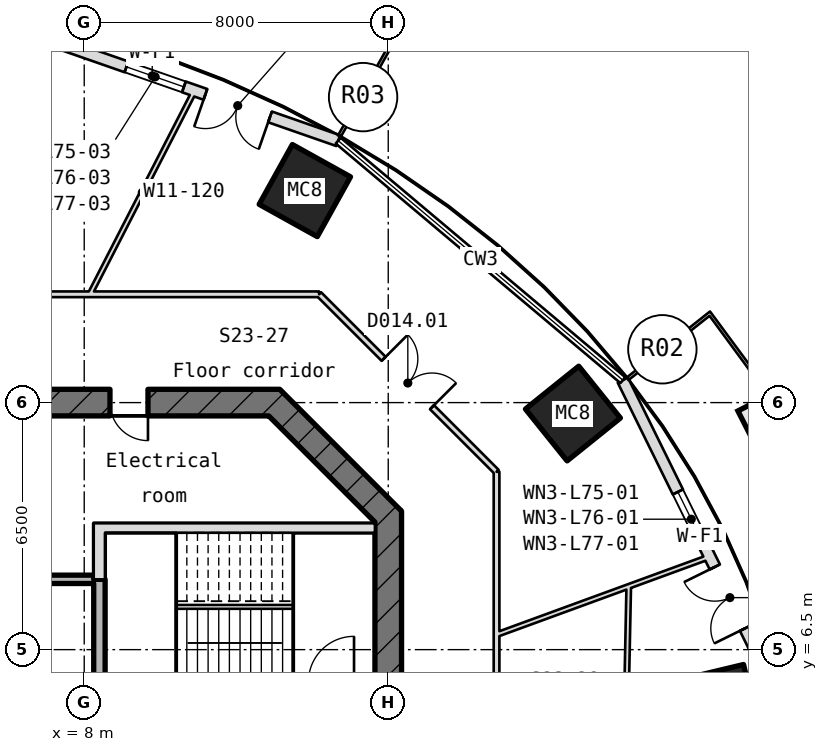
"""IFC4 building model, lengths in metres.
Left out: names, types, materials, properties, quantities, classifications, styles, units other than length and angle.
Written with IfcOpenShell. Run it as: python <this file> out.ifc"""

import sys

from ifc_helpers import new_model, si_unit, direction, frame, frame_2d, origin, origin_2d, place, context, subcontext, project, spatial, rectangle, hollow_rectangle, extrude, element, fill, save


model = new_model("IFC4")
c1 = context("Model", 3, precision=1e-05, world=origin(), true_north=direction((0.0, 1.0)))
c2 = subcontext(c1, "Body", "Model", "MODEL_VIEW")
j1 = project(units=[si_unit("LENGTHUNIT", "METRE"), si_unit("PLANEANGLEUNIT", "RADIAN")], contexts=[c1])
p1 = place(None, origin())
s1 = spatial("IfcSite", under=j1, at=p1, CompositionType="ELEMENT")
p2 = place(p1, origin())
s2 = spatial("IfcBuilding", under=s1, at=p2, CompositionType="ELEMENT")
p3 = place(p2, frame((0.0, 0.0, 334.3)))
s3 = spatial("IfcBuildingStorey", under=s2, at=p3, CompositionType="ELEMENT", Elevation=334.3)
for number, where, z_axis, x_axis in (
    (1, (24.678, 5.048, -0.18), (0.0, 0.0, 1.0), (0.233, -0.973, 0.0)),
    (2, (20.86, 12.712, -0.18), (0.0, 0.0, 1.0), (0.626, -0.78, 0.0)),
    (3, (13.805, 18.579, -0.18), (0.0, 0.0, 1.0), (0.874, -0.486, 0.0)),
):
    element("IfcColumn", number, at=place(p3, frame(where, z_axis=z_axis, x_axis=x_axis)), inside=s3, PredefinedType="COLUMN", context=c2, shape_type="SweptSolid", body=[
        extrude(hollow_rectangle(XDim=1.75, YDim=1.8, WallThickness=0.055, at=origin_2d()), origin(), (0.0, 0.0, 1.0), 4.15),
    ])
p4 = place(p3, frame((26.227, 5.356, 0.0), z_axis=(0.0, 0.0, 1.0), x_axis=(-0.441682707494, 0.89717132472, 0.0)))
e4 = element("IfcWall", 4, at=p4, inside=s3, PredefinedType="SOLIDWALL", context=c2, shape_type="SweptSolid", body=[
    extrude(rectangle(XDim=9.178, YDim=0.3, at=frame_2d((4.589, 0.0))), origin(), (0.0, 0.0, 1.0), 3.97),
])
p5 = place(p4, frame((1.9, 0.0, 0.0)))
e5 = element("IfcOpeningElement", 5, at=p5, cuts=e4, PredefinedType="OPENING", context=c2, shape_type="SweptSolid", body=[
    extrude(rectangle(XDim=1.8, YDim=2.4, at=frame_2d((0.9, 1.2))), frame((0.0, 0.16, 0.0), z_axis=(0.0, -1.0, 0.0), x_axis=(1.0, 0.0, 0.0)), (0.0, 0.0, 1.0), 0.32),
])
p6 = place(p4, frame((4.3, 0.0, 0.9)))
e6 = element("IfcOpeningElement", 6, at=p6, cuts=e4, PredefinedType="OPENING", context=c2, shape_type="SweptSolid", body=[
    extrude(rectangle(XDim=1.6, YDim=1.5, at=frame_2d((0.8, 0.75))), frame((0.0, 0.16, 0.0), z_axis=(0.0, -1.0, 0.0), x_axis=(1.0, 0.0, 0.0)), (0.0, 0.0, 1.0), 0.32),
])
p7 = place(p3, frame((14.683, 19.892, 0.0), z_axis=(0.0, 0.0, 1.0), x_axis=(-0.944291634301, 0.329109874341, 0.0)))
e7 = element("IfcWall", 7, at=p7, inside=s3, PredefinedType="SOLIDWALL", context=c2, shape_type="SweptSolid", body=[
    extrude(rectangle(XDim=10.364, YDim=0.3, at=frame_2d((5.182, 0.0))), origin(), (0.0, 0.0, 1.0), 3.97),
])
p8 = place(p7, frame((1.9, 0.0, 0.0)))
e8 = element("IfcOpeningElement", 8, at=p8, cuts=e7, PredefinedType="OPENING", context=c2, shape_type="SweptSolid", body=[
    extrude(rectangle(XDim=1.8, YDim=2.4, at=frame_2d((0.9, 1.2))), frame((0.0, 0.16, 0.0), z_axis=(0.0, -1.0, 0.0), x_axis=(1.0, 0.0, 0.0)), (0.0, 0.0, 1.0), 0.32),
])
p9 = place(p7, frame((4.3, 0.0, 0.9)))
e9 = element("IfcOpeningElement", 9, at=p9, cuts=e7, PredefinedType="OPENING", context=c2, shape_type="SweptSolid", body=[
    extrude(rectangle(XDim=1.6, YDim=1.5, at=frame_2d((0.8, 0.75))), frame((0.0, 0.16, 0.0), z_axis=(0.0, -1.0, 0.0), x_axis=(1.0, 0.0, 0.0)), (0.0, 0.0, 1.0), 0.32),
])
p10 = place(p3, frame((16.0, -10.145, -0.18), z_axis=(0.0, 0.0, 1.0), x_axis=(0.0, 1.0, 0.0)))
e10 = element("IfcWall", 10, at=p10, inside=s3, PredefinedType="SHEAR", context=c2, shape_type="SweptSolid", body=[
    extrude(rectangle(XDim=20.29, YDim=0.7, at=frame_2d((10.145, 0.0))), origin(), (0.0, 0.0, 1.0), 4.15),
])
p11 = place(p10, frame((8.945, 0.0, 0.18)))
e11 = element("IfcOpeningElement", 11, at=p11, cuts=e10, PredefinedType="OPENING", context=c2, shape_type="SweptSolid", body=[
    extrude(rectangle(XDim=2.4, YDim=2.1, at=frame_2d((1.2, 1.05))), frame((0.0, 0.36, 0.0), z_axis=(0.0, -1.0, 0.0), x_axis=(1.0, 0.0, 0.0)), (0.0, 0.0, 1.0), 0.72),
])
p12 = place(p10, frame((13.545, 0.0, 0.18)))
e12 = element("IfcOpeningElement", 12, at=p12, cuts=e10, PredefinedType="OPENING", context=c2, shape_type="SweptSolid", body=[
    extrude(rectangle(XDim=1.2, YDim=2.1, at=frame_2d((0.6, 1.05))), frame((0.0, 0.36, 0.0), z_axis=(0.0, -1.0, 0.0), x_axis=(1.0, 0.0, 0.0)), (0.0, 0.0, 1.0), 0.72),
])
p13 = place(p10, frame((2.4, 0.0, 0.18)))
e13 = element("IfcOpeningElement", 13, at=p13, cuts=e10, PredefinedType="OPENING", context=c2, shape_type="SweptSolid", body=[
    extrude(rectangle(XDim=1.2, YDim=2.1, at=frame_2d((0.6, 1.05))), frame((0.0, 0.36, 0.0), z_axis=(0.0, -1.0, 0.0), x_axis=(1.0, 0.0, 0.0)), (0.0, 0.0, 1.0), 0.72),
])
p14 = place(p3, frame((16.103, 9.897, -0.18), z_axis=(0.0, 0.0, 1.0), x_axis=(-0.707106781187, 0.707106781187, 0.0)))
e14 = element("IfcWall", 14, at=p14, inside=s3, PredefinedType="SHEAR", context=c2, shape_type="SweptSolid", body=[
    extrude(rectangle(XDim=4.533, YDim=0.7, at=frame_2d((2.266, 0.0))), origin(), (0.0, 0.0, 1.0), 4.15),
])
p15 = place(p3, frame((13.145, 13.0, -0.18), z_axis=(0.0, 0.0, 1.0), x_axis=(-1.0, 0.0, 0.0)))
e15 = element("IfcWall", 15, at=p15, inside=s3, PredefinedType="SHEAR", context=c2, shape_type="SweptSolid", body=[
    extrude(rectangle(XDim=26.29, YDim=0.7, at=frame_2d((13.145, 0.0))), origin(), (0.0, 0.0, 1.0), 4.15),
])
p16 = place(p15, frame((22.89, 0.0, 0.18)))
e16 = element("IfcOpeningElement", 16, at=p16, cuts=e15, PredefinedType="OPENING", context=c2, shape_type="SweptSolid", body=[
    extrude(rectangle(XDim=1.0, YDim=2.1, at=frame_2d((0.5, 1.05))), frame((0.0, 0.36, 0.0), z_axis=(0.0, -1.0, 0.0), x_axis=(1.0, 0.0, 0.0)), (0.0, 0.0, 1.0), 0.72),
])
p17 = place(p15, frame((17.645, 0.0, 0.18)))
e17 = element("IfcOpeningElement", 17, at=p17, cuts=e15, PredefinedType="OPENING", context=c2, shape_type="SweptSolid", body=[
    extrude(rectangle(XDim=1.0, YDim=2.1, at=frame_2d((0.5, 1.05))), frame((0.0, 0.36, 0.0), z_axis=(0.0, -1.0, 0.0), x_axis=(1.0, 0.0, 0.0)), (0.0, 0.0, 1.0), 0.72),
])
p18 = place(p15, frame((10.895, 0.0, 0.18)))
e18 = element("IfcOpeningElement", 18, at=p18, cuts=e15, PredefinedType="OPENING", context=c2, shape_type="SweptSolid", body=[
    extrude(rectangle(XDim=1.0, YDim=2.1, at=frame_2d((0.5, 1.05))), frame((0.0, 0.36, 0.0), z_axis=(0.0, -1.0, 0.0), x_axis=(1.0, 0.0, 0.0)), (0.0, 0.0, 1.0), 0.72),
])
p19 = place(p15, frame((3.467, 0.0, 0.18)))
e19 = element("IfcOpeningElement", 19, at=p19, cuts=e15, PredefinedType="OPENING", context=c2, shape_type="SweptSolid", body=[
    extrude(rectangle(XDim=1.0, YDim=2.1, at=frame_2d((0.5, 1.05))), frame((0.0, 0.36, 0.0), z_axis=(0.0, -1.0, 0.0), x_axis=(1.0, 0.0, 0.0)), (0.0, 0.0, 1.0), 0.72),
])
p20 = place(p3, frame((2.91, 8.35, 0.0), z_axis=(0.0, 0.0, 1.0), x_axis=(1.0, 0.0, 0.0)))
e20 = element("IfcWall", 20, at=p20, inside=s3, PredefinedType="STANDARD", context=c2, shape_type="SweptSolid", body=[
    extrude(rectangle(XDim=5.34, YDim=0.22, at=frame_2d((2.67, 0.0))), origin(), (0.0, 0.0, 1.0), 3.97),
])
p21 = place(p3, frame((8.55, 9.7, -0.18), z_axis=(0.0, 0.0, 1.0), x_axis=(1.0, 0.0, 0.0)))
e21 = element("IfcWall", 21, at=p21, inside=s3, PredefinedType="SHEAR", context=c2, shape_type="SweptSolid", body=[
    extrude(rectangle(XDim=7.1, YDim=0.25, at=frame_2d((3.55, 0.0))), origin(), (0.0, 0.0, 1.0), 4.15),
])
p22 = place(p3, frame((8.4, 2.5, -0.18), z_axis=(0.0, 0.0, 1.0), x_axis=(0.0, 1.0, 0.0)))
e22 = element("IfcWall", 22, at=p22, inside=s3, PredefinedType="SHEAR", context=c2, shape_type="SweptSolid", body=[
    extrude(rectangle(XDim=5.85, YDim=0.3, at=frame_2d((2.925, 0.0))), origin(), (0.0, 0.0, 1.0), 4.15),
])
p23 = place(p3, frame((8.4, 8.35, -0.18), z_axis=(0.0, 0.0, 1.0), x_axis=(0.0, 1.0, 0.0)))
e23 = element("IfcWall", 23, at=p23, inside=s3, PredefinedType="SHEAR", context=c2, shape_type="SweptSolid", body=[
    extrude(rectangle(XDim=1.475, YDim=0.3, at=frame_2d((0.737, 0.0))), origin(), (0.0, 0.0, 1.0), 4.15),
])
p24 = place(p3, frame((-14.18, 15.85, 0.0), z_axis=(0.0, 0.0, 1.0), x_axis=(1.0, 0.0, 0.0)))
e24 = element("IfcWall", 24, at=p24, inside=s3, PredefinedType="PARTITIONING", context=c2, shape_type="SweptSolid", body=[
    extrude(rectangle(XDim=28.361, YDim=0.15, at=frame_2d((14.18, 0.0))), origin(), (0.0, 0.0, 1.0), 3.97),
])
p25 = place(p24, frame((11.294, 0.0, 0.0)))
e25 = element("IfcOpeningElement", 25, at=p25, cuts=e24, PredefinedType="OPENING", context=c2, shape_type="SweptSolid", body=[
    extrude(rectangle(XDim=0.95, YDim=2.1, at=frame_2d((0.475, 1.05))), frame((0.0, 0.085, 0.0), z_axis=(0.0, -1.0, 0.0), x_axis=(1.0, 0.0, 0.0)), (0.0, 0.0, 1.0), 0.17),
])
p26 = place(p24, frame((18.359, 0.0, 0.0)))
e26 = element("IfcOpeningElement", 26, at=p26, cuts=e24, PredefinedType="OPENING", context=c2, shape_type="SweptSolid", body=[
    extrude(rectangle(XDim=1.8, YDim=2.1, at=frame_2d((0.9, 1.05))), frame((0.0, 0.085, 0.0), z_axis=(0.0, -1.0, 0.0), x_axis=(1.0, 0.0, 0.0)), (0.0, 0.0, 1.0), 0.17),
])
p27 = place(p24, frame((4.727, 0.0, 0.0)))
e27 = element("IfcOpeningElement", 27, at=p27, cuts=e24, PredefinedType="OPENING", context=c2, shape_type="SweptSolid", body=[
    extrude(rectangle(XDim=1.8, YDim=2.1, at=frame_2d((0.9, 1.05))), frame((0.0, 0.085, 0.0), z_axis=(0.0, -1.0, 0.0), x_axis=(1.0, 0.0, 0.0)), (0.0, 0.0, 1.0), 0.17),
])
p28 = place(p24, frame((1.476, 0.0, 0.0)))
e28 = element("IfcOpeningElement", 28, at=p28, cuts=e24, PredefinedType="OPENING", context=c2, shape_type="SweptSolid", body=[
    extrude(rectangle(XDim=0.95, YDim=2.1, at=frame_2d((0.475, 1.05))), frame((0.0, 0.085, 0.0), z_axis=(0.0, -1.0, 0.0), x_axis=(1.0, 0.0, 0.0)), (0.0, 0.0, 1.0), 0.17),
])
p29 = place(p3, frame((8.15, 15.85, 0.0), z_axis=(0.0, 0.0, 1.0), x_axis=(0.457314139227, 0.889305222105, 0.0)))
e29 = element("IfcWall", 29, at=p29, inside=s3, PredefinedType="PARTITIONING", context=c2, shape_type="SweptSolid", body=[
    extrude(rectangle(XDim=6.026, YDim=0.12, at=frame_2d((3.013, 0.0))), origin(), (0.0, 0.0, 1.0), 3.97),
])
p30 = place(p3, frame((14.18, 15.85, 0.0), z_axis=(0.0, 0.0, 1.0), x_axis=(0.707106781187, -0.707106781187, 0.0)))
e30 = element("IfcWall", 30, at=p30, inside=s3, PredefinedType="PARTITIONING", context=c2, shape_type="SweptSolid", body=[
    extrude(rectangle(XDim=6.604, YDim=0.15, at=frame_2d((3.302, 0.0))), origin(), (0.0, 0.0, 1.0), 3.97),
])
p31 = place(p30, frame((2.402, 0.0, 0.0)))
e31 = element("IfcOpeningElement", 31, at=p31, cuts=e30, PredefinedType="OPENING", context=c2, shape_type="SweptSolid", body=[
    extrude(rectangle(XDim=1.8, YDim=2.1, at=frame_2d((0.9, 1.05))), frame((0.0, 0.085, 0.0), z_axis=(0.0, -1.0, 0.0), x_axis=(1.0, 0.0, 0.0)), (0.0, 0.0, 1.0), 0.17),
])
p32 = place(p3, frame((18.85, 6.893, 0.0), z_axis=(0.0, 0.0, 1.0), x_axis=(0.939166586635, 0.34346196667, 0.0)))
e32 = element("IfcWall", 32, at=p32, inside=s3, PredefinedType="PARTITIONING", context=c2, shape_type="SweptSolid", body=[
    extrude(rectangle(XDim=5.974, YDim=0.12, at=frame_2d((2.987, 0.0))), origin(), (0.0, 0.0, 1.0), 3.97),
])
p33 = place(p3, frame((18.85, 11.18, 0.0), z_axis=(0.0, 0.0, 1.0), x_axis=(0.0, -1.0, 0.0)))
e33 = element("IfcWall", 33, at=p33, inside=s3, PredefinedType="PARTITIONING", context=c2, shape_type="SweptSolid", body=[
    extrude(rectangle(XDim=22.361, YDim=0.15, at=frame_2d((11.18, 0.0))), origin(), (0.0, 0.0, 1.0), 3.97),
])
p34 = place(p33, frame((7.759, 0.0, 0.0)))
e34 = element("IfcOpeningElement", 34, at=p34, cuts=e33, PredefinedType="OPENING", context=c2, shape_type="SweptSolid", body=[
    extrude(rectangle(XDim=0.95, YDim=2.1, at=frame_2d((0.475, 1.05))), frame((0.0, 0.085, 0.0), z_axis=(0.0, -1.0, 0.0), x_axis=(1.0, 0.0, 0.0)), (0.0, 0.0, 1.0), 0.17),
])
p35 = place(p33, frame((14.009, 0.0, 0.0)))
e35 = element("IfcOpeningElement", 35, at=p35, cuts=e33, PredefinedType="OPENING", context=c2, shape_type="SweptSolid", body=[
    extrude(rectangle(XDim=1.8, YDim=2.1, at=frame_2d((0.9, 1.05))), frame((0.0, 0.085, 0.0), z_axis=(0.0, -1.0, 0.0), x_axis=(1.0, 0.0, 0.0)), (0.0, 0.0, 1.0), 0.17),
])
p36 = place(p3, frame((22.137, -1.173, 0.0), z_axis=(0.0, 0.0, 1.0), x_axis=(0.020545219347, 0.999788924705, 0.0)))
e36 = element("IfcWall", 36, at=p36, inside=s3, PredefinedType="PARTITIONING", context=c2, shape_type="SweptSolid", body=[
    extrude(rectangle(XDim=9.34, YDim=0.12, at=frame_2d((4.67, 0.0))), origin(), (0.0, 0.0, 1.0), 3.97),
])
p37 = place(p5, origin())
e37 = element("IfcDoor", 37, at=p37, inside=s3, OperationType="SINGLE_SWING_LEFT", PredefinedType="DOOR", context=c2, shape_type="SweptSolid", body=[
    extrude(rectangle(XDim=1.8, YDim=2.4, at=frame_2d((0.9, 1.2))), frame((0.0, 0.025, 0.0), z_axis=(0.0, -1.0, 0.0), x_axis=(1.0, 0.0, 0.0)), (0.0, 0.0, 1.0), 0.05),
])
fill(e5, e37)
p38 = place(p6, origin())
e38 = element("IfcWindow", 38, at=p38, inside=s3, PartitioningType="SINGLE_PANEL", PredefinedType="WINDOW", context=c2, shape_type="SweptSolid", body=[
    extrude(rectangle(XDim=1.6, YDim=1.5, at=frame_2d((0.8, 0.75))), frame((0.0, 0.03, 0.0), z_axis=(0.0, -1.0, 0.0), x_axis=(1.0, 0.0, 0.0)), (0.0, 0.0, 1.0), 0.06),
])
fill(e6, e38)
p39 = place(p8, origin())
e39 = element("IfcDoor", 39, at=p39, inside=s3, OperationType="SINGLE_SWING_LEFT", PredefinedType="DOOR", context=c2, shape_type="SweptSolid", body=[
    extrude(rectangle(XDim=1.8, YDim=2.4, at=frame_2d((0.9, 1.2))), frame((0.0, 0.025, 0.0), z_axis=(0.0, -1.0, 0.0), x_axis=(1.0, 0.0, 0.0)), (0.0, 0.0, 1.0), 0.05),
])
fill(e8, e39)
p40 = place(p9, origin())
e40 = element("IfcWindow", 40, at=p40, inside=s3, PartitioningType="SINGLE_PANEL", PredefinedType="WINDOW", context=c2, shape_type="SweptSolid", body=[
    extrude(rectangle(XDim=1.6, YDim=1.5, at=frame_2d((0.8, 0.75))), frame((0.0, 0.03, 0.0), z_axis=(0.0, -1.0, 0.0), x_axis=(1.0, 0.0, 0.0)), (0.0, 0.0, 1.0), 0.06),
])
fill(e9, e40)
p41 = place(p19, origin())
e41 = element("IfcDoor", 41, at=p41, inside=s3, OperationType="SINGLE_SWING_RIGHT", PredefinedType="DOOR", context=c2, shape_type="SweptSolid", body=[
    extrude(rectangle(XDim=1.0, YDim=2.1, at=frame_2d((0.5, 1.05))), frame((0.0, 0.025, 0.0), z_axis=(0.0, -1.0, 0.0), x_axis=(1.0, 0.0, 0.0)), (0.0, 0.0, 1.0), 0.05),
])
fill(e19, e41)
p42 = place(p31, origin())
e42 = element("IfcDoor", 42, at=p42, inside=s3, OperationType="DOUBLE_DOOR_SINGLE_SWING", PredefinedType="DOOR", context=c2, shape_type="SweptSolid", body=[
    extrude(rectangle(XDim=1.8, YDim=2.1, at=frame_2d((0.9, 1.05))), frame((0.0, 0.025, 0.0), z_axis=(0.0, -1.0, 0.0), x_axis=(1.0, 0.0, 0.0)), (0.0, 0.0, 1.0), 0.05),
])
fill(e31, e42)
save(model, sys.argv[1])
